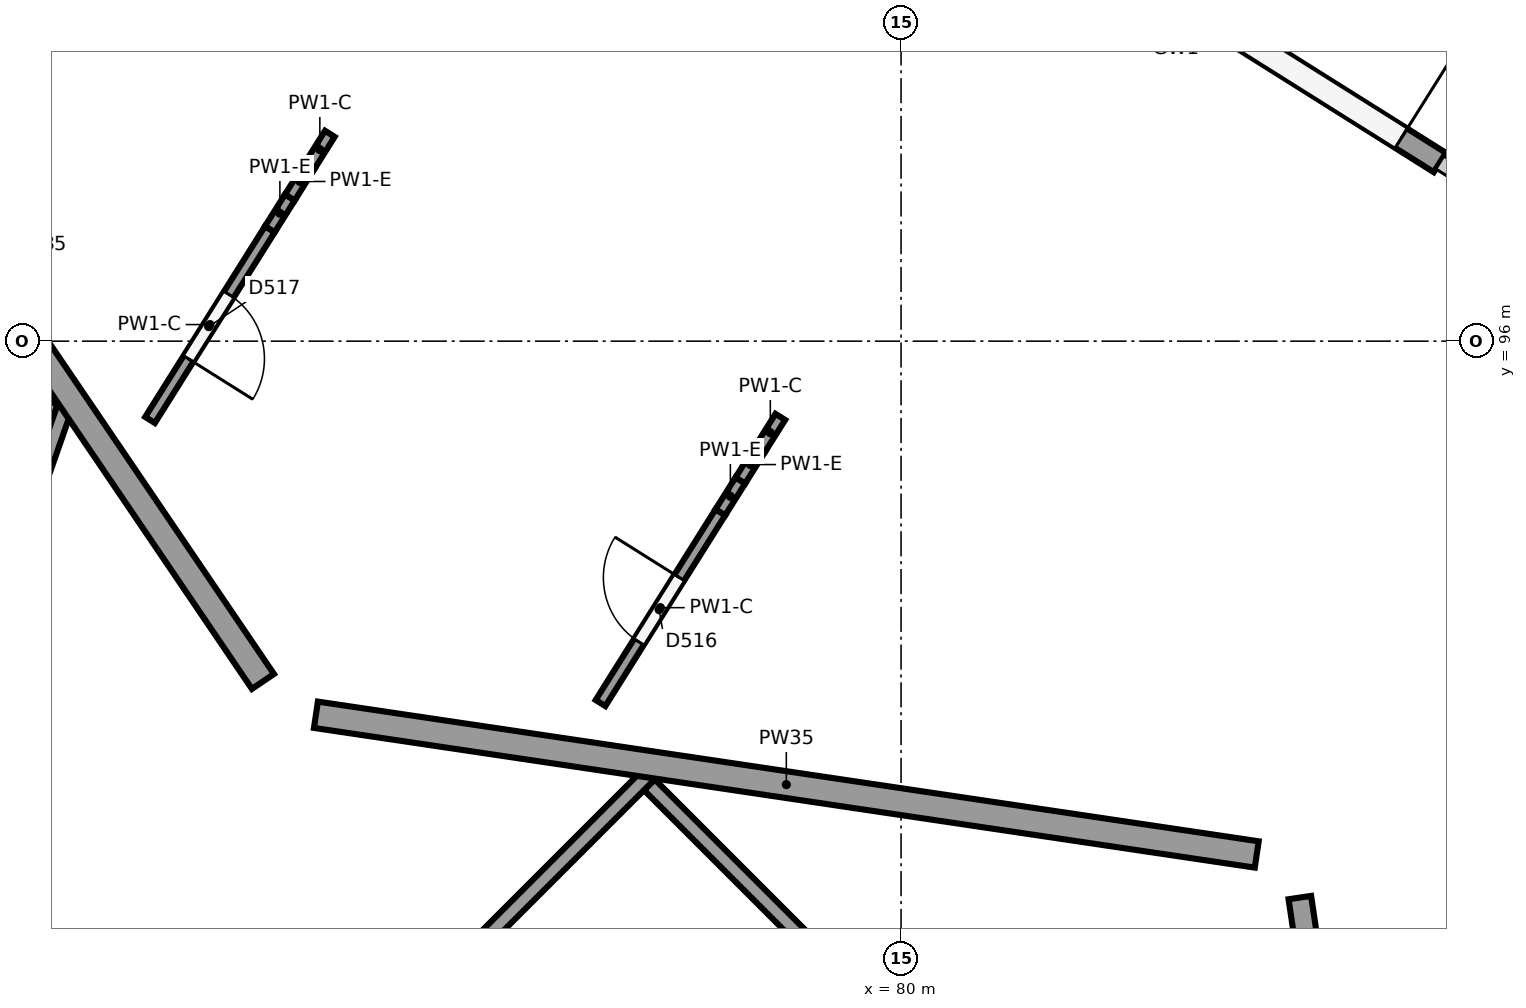
"""IFC4 building model, lengths in metres.
Left out: names, types, materials, properties, quantities, classifications, styles, units other than length and angle.
Written with IfcOpenShell. Run it as: python <this file> out.ifc"""

import sys

from ifc_helpers import new_model, si_unit, direction, frame, frame_2d, origin, origin_2d, place, context, subcontext, project, spatial, rectangle, circle, extrude, element, fill, save


model = new_model("IFC4")
c1 = context("Model", 3, precision=1e-05, world=origin(), true_north=direction((0.0, 1.0)))
c2 = subcontext(c1, "Body", "Model", "MODEL_VIEW")
j1 = project(units=[si_unit("LENGTHUNIT", "METRE"), si_unit("PLANEANGLEUNIT", "RADIAN")], contexts=[c1])
p1 = place(None, origin())
s1 = spatial("IfcSite", under=j1, at=p1, CompositionType="ELEMENT")
p2 = place(p1, origin())
s2 = spatial("IfcBuilding", under=s1, at=p2, CompositionType="ELEMENT")
p3 = place(p2, origin())
s3 = spatial("IfcBuildingStorey", under=s2, at=p3, CompositionType="ELEMENT", Elevation=0.0)
p4 = place(p3, frame((85.174, 89.174, 0.0), z_axis=(0.0, 0.0, 1.0), x_axis=(1.0, 0.0, 0.0)))
e1 = element("IfcColumn", 1, at=p4, inside=s3, PredefinedType="COLUMN", context=c2, shape_type="SweptSolid", body=[
    extrude(circle(Radius=0.5, at=origin_2d()), origin(), (0.0, 0.0, 1.0), 6.5),
])
p5 = place(p3, frame((71.857, 91.151, 0.0), z_axis=(0.0, 0.0, 1.0), x_axis=(1.0, 0.0, 0.0)))
e2 = element("IfcColumn", 2, at=p5, inside=s3, PredefinedType="COLUMN", context=c2, shape_type="SweptSolid", body=[
    extrude(circle(Radius=0.45, at=origin_2d()), origin(), (0.0, 0.0, 1.0), 6.5),
])
p6 = place(p3, frame((87.427, 91.427, -0.3), z_axis=(0.0, 0.0, 1.0), x_axis=(1.0, 0.0, 0.0)))
e3 = element("IfcColumn", 3, at=p6, inside=s3, PredefinedType="COLUMN", context=c2, shape_type="SweptSolid", body=[
    extrude(circle(Radius=0.4, at=origin_2d()), origin(), (0.0, 0.0, 1.0), 6.8),
])
for number, where, z_axis, x_axis in (
    (4, (82.719, 90.939, -0.3), (0.0, 0.0, 1.0), (1.0, 0.0, 0.0)),
    (5, (74.836, 95.893, -0.3), (0.0, 0.0, 1.0), (1.0, 0.0, 0.0)),
    (6, (84.463, 93.15, -0.3), (0.0, 0.0, 1.0), (1.0, 0.0, 0.0)),
    (7, (80.394, 95.707, -0.3), (0.0, 0.0, 1.0), (1.0, 0.0, 0.0)),
    (8, (76.326, 98.263, -0.3), (0.0, 0.0, 1.0), (1.0, 0.0, 0.0)),
    (9, (86.494, 95.181, -0.3), (0.0, 0.0, 1.0), (1.0, 0.0, 0.0)),
    (10, (82.155, 97.908, -0.3), (0.0, 0.0, 1.0), (1.0, 0.0, 0.0)),
):
    element("IfcColumn", number, at=place(p3, frame(where, z_axis=z_axis, x_axis=x_axis)), inside=s3, PredefinedType="COLUMN", context=c2, shape_type="SweptSolid", body=[
        extrude(circle(Radius=0.3, at=origin_2d()), origin(), (0.0, 0.0, 1.0), 6.8),
    ])
p7 = place(p3, frame((80.992, 102.181, 0.0), z_axis=(0.0, 0.0, 1.0), x_axis=(0.846713800268, -0.532048626006, 0.0)))
e11 = element("IfcWall", 11, at=p7, inside=s3, PredefinedType="SOLIDWALL", context=c2, shape_type="SweptSolid", body=[
    extrude(rectangle(XDim=7.2, YDim=0.3, at=frame_2d((3.6, 0.0))), origin(), (0.0, 0.0, 1.0), 5.05),
])
p8 = place(p7, frame((0.6, 0.0, 0.0)))
e12 = element("IfcOpeningElement", 12, at=p8, cuts=e11, PredefinedType="OPENING", context=c2, shape_type="SweptSolid", body=[
    extrude(rectangle(XDim=6.0, YDim=3.4, at=frame_2d((3.0, 1.7))), frame((0.0, 0.16, 0.0), z_axis=(0.0, -1.0, 0.0), x_axis=(1.0, 0.0, 0.0)), (0.0, 0.0, 1.0), 0.32),
])
p9 = place(p3, frame((85.247, 88.68, 0.0), z_axis=(0.0, 0.0, 1.0), x_axis=(0.14684632149, -0.989159318747, 0.0)))
e13 = element("IfcWall", 13, at=p9, inside=s3, PredefinedType="SOLIDWALL", context=c2, shape_type="SweptSolid", body=[
    extrude(rectangle(XDim=12.514, YDim=0.3, at=frame_2d((6.257, 0.0))), origin(), (0.0, 0.0, 1.0), 4.85),
])
p10 = place(p3, frame((72.301, 91.085, 0.0), z_axis=(0.0, 0.0, 1.0), x_axis=(0.989159318747, -0.14684632149, 0.0)))
e14 = element("IfcWall", 14, at=p10, inside=s3, PredefinedType="SOLIDWALL", context=c2, shape_type="SweptSolid", body=[
    extrude(rectangle(XDim=12.514, YDim=0.35, at=frame_2d((6.257, 0.0))), origin(), (0.0, 0.0, 1.0), 4.85),
])
p11 = place(p3, frame((64.578, 101.877, 0.0), z_axis=(0.0, 0.0, 1.0), x_axis=(0.561493784496, -0.827480954447, 0.0)))
e15 = element("IfcWall", 15, at=p11, inside=s3, PredefinedType="SOLIDWALL", context=c2, shape_type="SweptSolid", body=[
    extrude(rectangle(XDim=12.513, YDim=0.35, at=frame_2d((6.257, 0.0))), origin(), (0.0, 0.0, 1.0), 4.85),
])
p12 = place(p3, frame((76.688, 90.305, 0.0), z_axis=(0.0, 0.0, 1.0), x_axis=(-0.707106781187, -0.707106781187, 0.0)))
e16 = element("IfcWall", 16, at=p12, inside=s3, PredefinedType="SHEAR", context=c2, shape_type="SweptSolid", body=[
    extrude(rectangle(XDim=9.8, YDim=0.2, at=frame_2d((4.9, 0.0))), origin(), (0.0, 0.0, 1.0), 6.15),
])
p13 = place(p3, frame((81.355, 85.497, 0.0), z_axis=(0.0, 0.0, 1.0), x_axis=(-0.707088285305, 0.707125276584, 0.0)))
e17 = element("IfcWall", 17, at=p13, inside=s3, PredefinedType="SHEAR", context=c2, shape_type="SweptSolid", body=[
    extrude(rectangle(XDim=6.6, YDim=0.2, at=frame_2d((3.3, 0.0))), origin(), (0.0, 0.0, 1.0), 6.15),
])
p14 = place(p3, frame((68.998, 95.137, 0.0), z_axis=(0.0, 0.0, 1.0), x_axis=(-0.330263153216, -0.943888896866, 0.0)))
e18 = element("IfcWall", 18, at=p14, inside=s3, PredefinedType="SHEAR", context=c2, shape_type="SweptSolid", body=[
    extrude(rectangle(XDim=8.1, YDim=0.2, at=frame_2d((4.05, 0.0))), origin(), (0.0, 0.0, 1.0), 6.15),
])
p15 = place(p3, frame((68.871, 95.076, 0.0), z_axis=(0.0, 0.0, 1.0), x_axis=(-0.943880844925, 0.330286164688, 0.0)))
e19 = element("IfcWall", 19, at=p15, inside=s3, PredefinedType="SHEAR", context=c2, shape_type="SweptSolid", body=[
    extrude(rectangle(XDim=6.6, YDim=0.2, at=frame_2d((3.3, 0.0))), origin(), (0.0, 0.0, 1.0), 6.15),
])
p16 = place(p3, frame((76.046, 91.239, 0.0), z_axis=(0.0, 0.0, 1.0), x_axis=(0.531974180768, 0.846760574776, 0.0)))
e20 = element("IfcWall", 20, at=p16, inside=s3, PredefinedType="PARTITIONING", context=c2, shape_type="SweptSolid", body=[
    extrude(rectangle(XDim=2.964, YDim=0.15, at=frame_2d((1.482, 0.0))), origin(), (0.0, 0.0, 1.0), 6.05),
])
p17 = place(p16, frame((0.95, 0.0, 0.0)))
e21 = element("IfcOpeningElement", 21, at=p17, cuts=e20, PredefinedType="OPENING", context=c2, shape_type="SweptSolid", body=[
    extrude(rectangle(XDim=1.0, YDim=2.1, at=frame_2d((0.5, 1.05))), frame((0.0, 0.085, 0.0), z_axis=(0.0, -1.0, 0.0), x_axis=(1.0, 0.0, 0.0)), (0.0, 0.0, 1.0), 0.17),
])
p18 = place(p3, frame((77.623, 93.749, 0.0), z_axis=(0.0, 0.0, 1.0), x_axis=(0.532040016941, 0.846719209876, 0.0)))
e22 = element("IfcWall", 22, at=p18, inside=s3, PredefinedType="PARTITIONING", context=c2, shape_type="SweptSolid", body=[
    extrude(rectangle(XDim=0.494, YDim=0.15, at=frame_2d((0.247, 0.0))), origin(), (0.0, 0.0, 1.0), 5.25),
])
p19 = place(p3, frame((77.886, 94.167, 0.0), z_axis=(0.0, 0.0, 1.0), x_axis=(0.53226263383, 0.846579286676, 0.0)))
e23 = element("IfcWall", 23, at=p19, inside=s3, PredefinedType="PARTITIONING", context=c2, shape_type="SweptSolid", body=[
    extrude(rectangle(XDim=0.494, YDim=0.15, at=frame_2d((0.247, 0.0))), origin(), (0.0, 0.0, 1.0), 5.25),
])
p20 = place(p3, frame((78.149, 94.586, 0.0), z_axis=(0.0, 0.0, 1.0), x_axis=(0.532040016941, 0.846719209876, 0.0)))
e24 = element("IfcWall", 24, at=p20, inside=s3, PredefinedType="PARTITIONING", context=c2, shape_type="SweptSolid", body=[
    extrude(rectangle(XDim=0.494, YDim=0.15, at=frame_2d((0.247, 0.0))), origin(), (0.0, 0.0, 1.0), 6.05),
])
p21 = place(p3, frame((71.696, 97.473, 0.0), z_axis=(0.0, 0.0, 1.0), x_axis=(-0.5319961315, -0.846746783914, 0.0)))
e25 = element("IfcWall", 25, at=p21, inside=s3, PredefinedType="PARTITIONING", context=c2, shape_type="SweptSolid", body=[
    extrude(rectangle(XDim=2.965, YDim=0.15, at=frame_2d((1.482, 0.0))), origin(), (0.0, 0.0, 1.0), 6.05),
])
p22 = place(p21, frame((1.014, 0.0, 0.0)))
e26 = element("IfcOpeningElement", 26, at=p22, cuts=e25, PredefinedType="OPENING", context=c2, shape_type="SweptSolid", body=[
    extrude(rectangle(XDim=1.0, YDim=2.1, at=frame_2d((0.5, 1.05))), frame((0.0, 0.085, 0.0), z_axis=(0.0, -1.0, 0.0), x_axis=(1.0, 0.0, 0.0)), (0.0, 0.0, 1.0), 0.17),
])
p23 = place(p3, frame((71.696, 97.473, 0.0), z_axis=(0.0, 0.0, 1.0), x_axis=(0.53226263383, 0.846579286676, 0.0)))
e27 = element("IfcWall", 27, at=p23, inside=s3, PredefinedType="PARTITIONING", context=c2, shape_type="SweptSolid", body=[
    extrude(rectangle(XDim=0.494, YDim=0.15, at=frame_2d((0.247, 0.0))), origin(), (0.0, 0.0, 1.0), 5.25),
])
p24 = place(p3, frame((71.959, 97.892, 0.0), z_axis=(0.0, 0.0, 1.0), x_axis=(0.532040016941, 0.846719209876, 0.0)))
e28 = element("IfcWall", 28, at=p24, inside=s3, PredefinedType="PARTITIONING", context=c2, shape_type="SweptSolid", body=[
    extrude(rectangle(XDim=0.494, YDim=0.15, at=frame_2d((0.247, 0.0))), origin(), (0.0, 0.0, 1.0), 5.25),
])
p25 = place(p3, frame((72.222, 98.31, 0.0), z_axis=(0.0, 0.0, 1.0), x_axis=(0.531908296505, 0.846801962745, 0.0)))
e29 = element("IfcWall", 29, at=p25, inside=s3, PredefinedType="PARTITIONING", context=c2, shape_type="SweptSolid", body=[
    extrude(rectangle(XDim=0.494, YDim=0.15, at=frame_2d((0.247, 0.0))), origin(), (0.0, 0.0, 1.0), 6.05),
])
p26 = place(p8, origin())
e30 = element("IfcDoor", 30, at=p26, inside=s3, OperationType="DOUBLE_DOOR_SINGLE_SWING", PredefinedType="DOOR", context=c2, shape_type="SweptSolid", body=[
    extrude(rectangle(XDim=6.0, YDim=3.4, at=frame_2d((3.0, 1.7))), frame((0.0, 0.025, 0.0), z_axis=(0.0, -1.0, 0.0), x_axis=(1.0, 0.0, 0.0)), (0.0, 0.0, 1.0), 0.05),
])
fill(e12, e30)
p27 = place(p17, origin())
e31 = element("IfcDoor", 31, at=p27, inside=s3, OperationType="SINGLE_SWING_RIGHT", PredefinedType="DOOR", context=c2, shape_type="SweptSolid", body=[
    extrude(rectangle(XDim=1.0, YDim=2.1, at=frame_2d((0.5, 1.05))), frame((0.0, 0.025, 0.0), z_axis=(0.0, -1.0, 0.0), x_axis=(1.0, 0.0, 0.0)), (0.0, 0.0, 1.0), 0.05),
])
fill(e21, e31)
p28 = place(p22, origin())
e32 = element("IfcDoor", 32, at=p28, inside=s3, OperationType="SINGLE_SWING_RIGHT", PredefinedType="DOOR", context=c2, shape_type="SweptSolid", body=[
    extrude(rectangle(XDim=1.0, YDim=2.1, at=frame_2d((0.5, 1.05))), frame((0.0, 0.025, 0.0), z_axis=(0.0, -1.0, 0.0), x_axis=(1.0, 0.0, 0.0)), (0.0, 0.0, 1.0), 0.05),
])
fill(e26, e32)
save(model, sys.argv[1])
